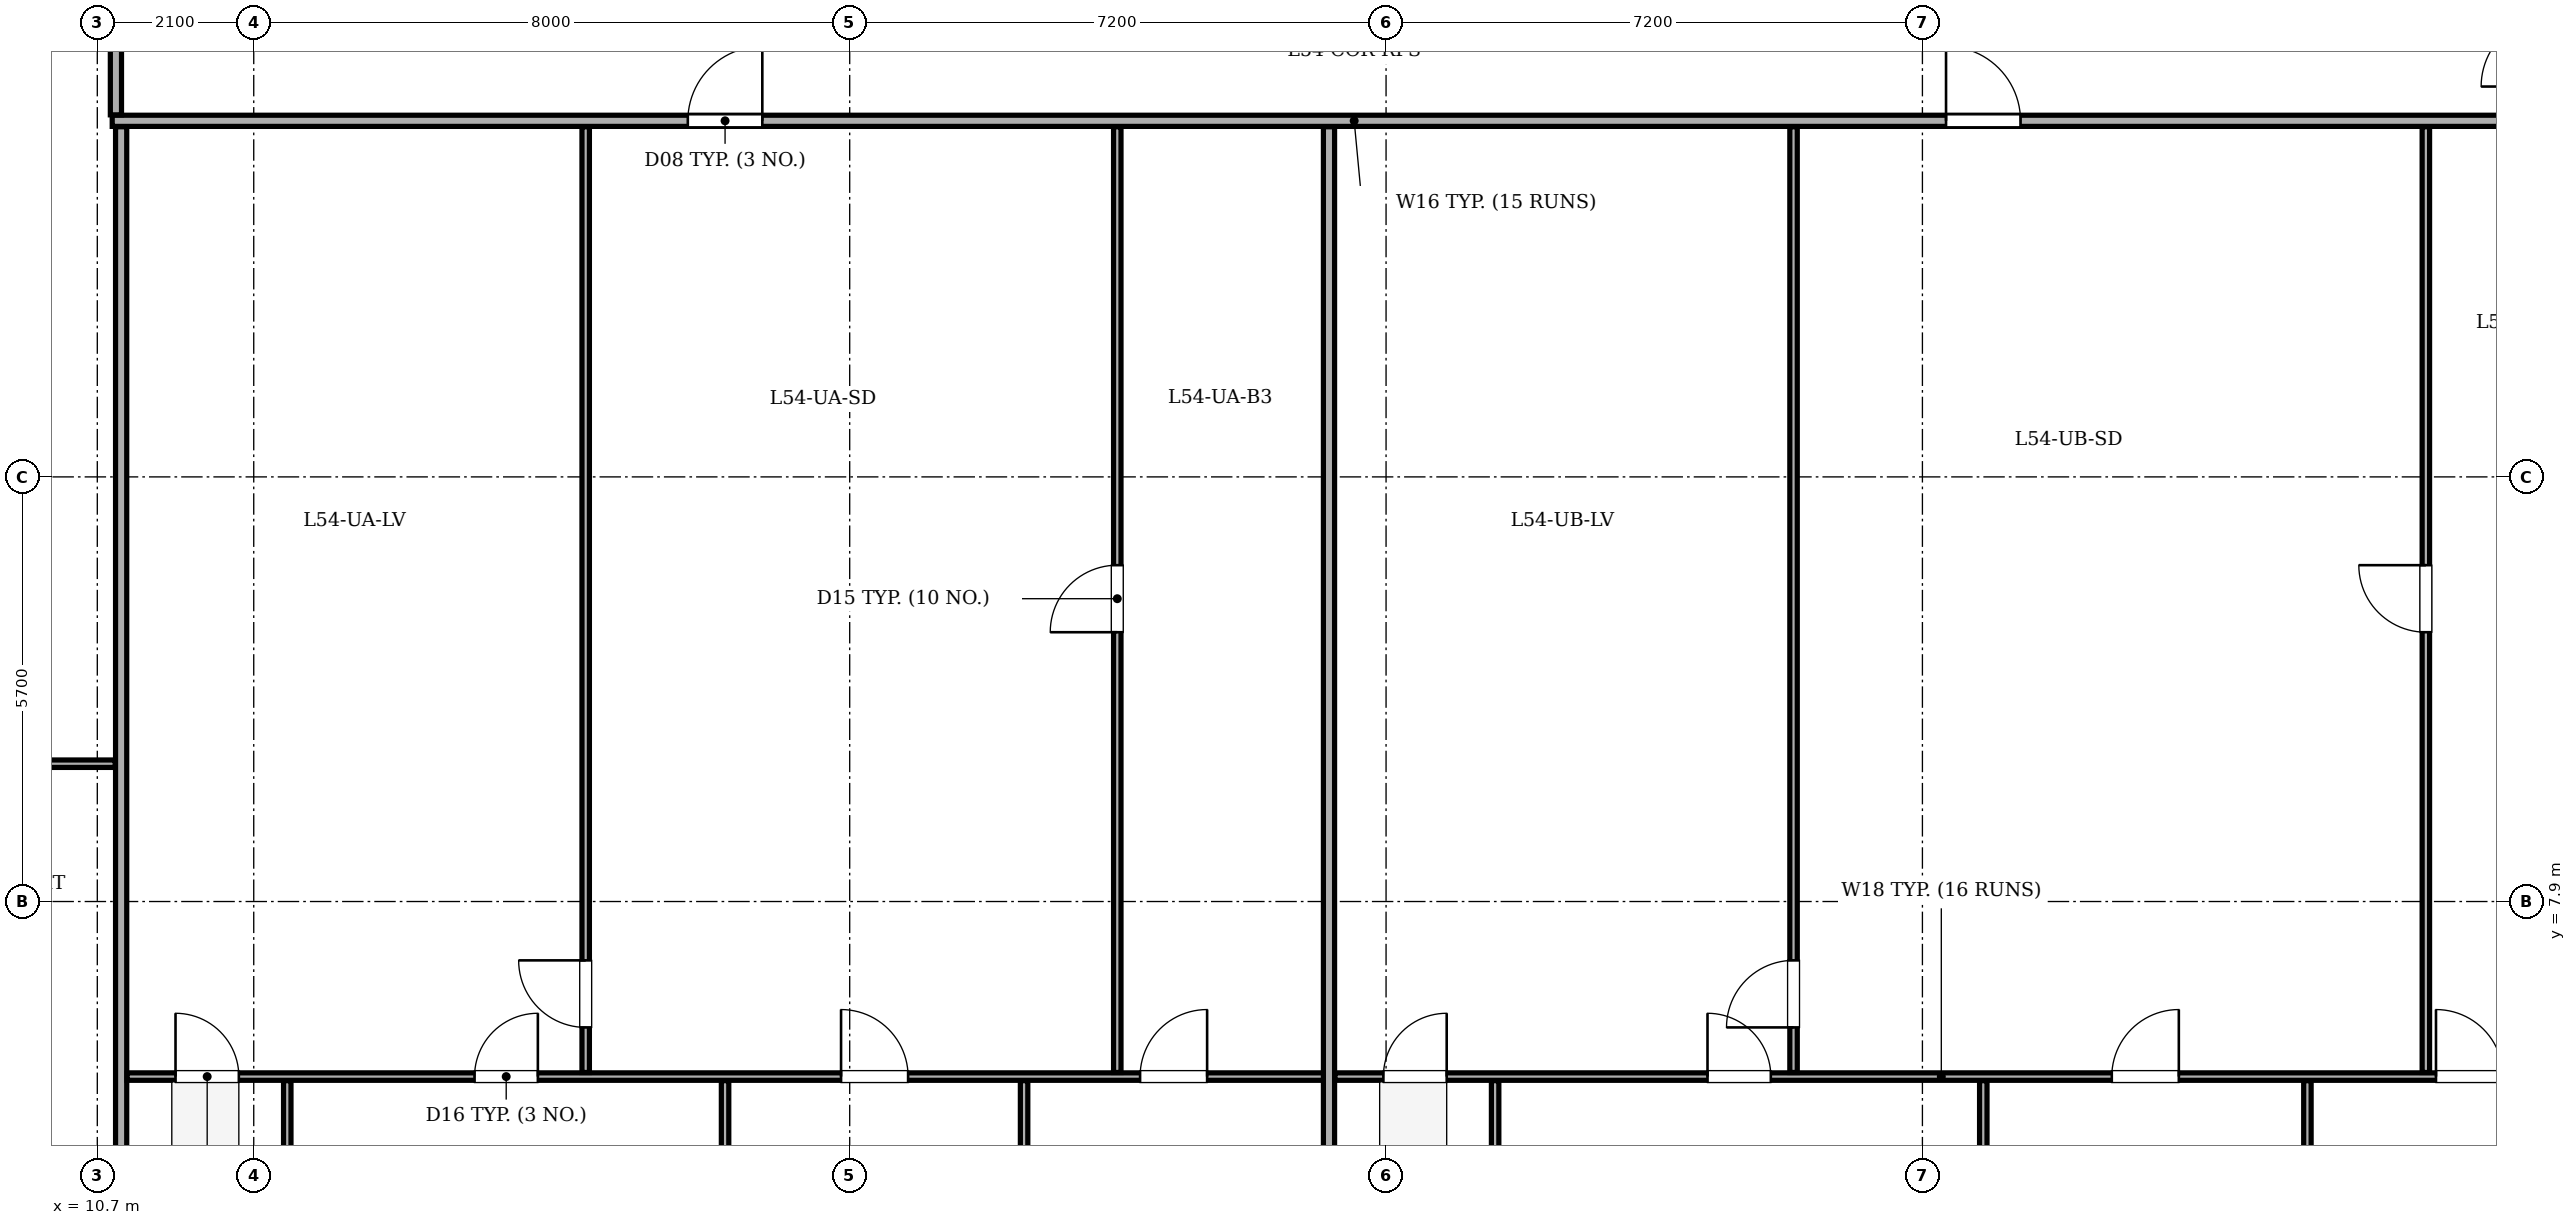
"""IFC4 building model, lengths in metres.
Left out: names, types, materials, properties, quantities, classifications, styles, units other than length and angle.
Written with IfcOpenShell. Run it as: python <this file> out.ifc"""

import sys

from ifc_helpers import new_model, si_unit, direction, frame, frame_2d, origin, place, context, subcontext, project, spatial, rectangle, extrude, element, fill, save


model = new_model("IFC4")
c1 = context("Model", 3, precision=1e-05, world=origin(), true_north=direction((0.0, 1.0)))
c2 = subcontext(c1, "Body", "Model", "MODEL_VIEW")
j1 = project(units=[si_unit("LENGTHUNIT", "METRE"), si_unit("PLANEANGLEUNIT", "RADIAN")], contexts=[c1])
p1 = place(None, origin())
s1 = spatial("IfcSite", under=j1, at=p1, CompositionType="ELEMENT")
p2 = place(p1, origin())
s2 = spatial("IfcBuilding", under=s1, at=p2, CompositionType="ELEMENT")
p3 = place(p2, frame((0.0, 0.0, 210.9)))
s3 = spatial("IfcBuildingStorey", under=s2, at=p3, CompositionType="ELEMENT", Elevation=210.9)
p4 = place(p3, frame((10.9, 18.38, 0.0), z_axis=(0.0, 0.0, 1.0), x_axis=(1.0, 0.0, 0.0)))
e1 = element("IfcWall", 1, at=p4, inside=s3, PredefinedType="PARTITIONING", context=c2, shape_type="SweptSolid", body=[
    extrude(rectangle(XDim=34.02, YDim=0.15, at=frame_2d((17.01, 0.0))), origin(), (0.0, 0.0, 1.0), 3.1),
])
p5 = place(p4, frame((7.727, 0.0, 0.0)))
e2 = element("IfcOpeningElement", 2, at=p5, cuts=e1, PredefinedType="OPENING", context=c2, shape_type="SweptSolid", body=[
    extrude(rectangle(XDim=1.0, YDim=2.1, at=frame_2d((0.5, 1.05))), frame((0.0, 0.085, 0.0), z_axis=(0.0, -1.0, 0.0), x_axis=(1.0, 0.0, 0.0)), (0.0, 0.0, 1.0), 0.17),
])
p6 = place(p4, frame((24.617, 0.0, 0.0)))
e3 = element("IfcOpeningElement", 3, at=p6, cuts=e1, PredefinedType="OPENING", context=c2, shape_type="SweptSolid", body=[
    extrude(rectangle(XDim=1.0, YDim=2.1, at=frame_2d((0.5, 1.05))), frame((0.0, 0.085, 0.0), z_axis=(0.0, -1.0, 0.0), x_axis=(1.0, 0.0, 0.0)), (0.0, 0.0, 1.0), 0.17),
])
p7 = place(p3, frame((11.02, 3.045, 0.0), z_axis=(0.0, 0.0, 1.0), x_axis=(0.0, 1.0, 0.0)))
e4 = element("IfcWall", 4, at=p7, inside=s3, PredefinedType="PARTITIONING", context=c2, shape_type="SweptSolid", body=[
    extrude(rectangle(XDim=15.255, YDim=0.15, at=frame_2d((7.627, 0.0))), origin(), (0.0, 0.0, 1.0), 3.1),
])
p8 = place(p3, frame((11.1, 5.55, 0.0), z_axis=(0.0, 0.0, 1.0), x_axis=(1.0, 0.0, 0.0)))
e5 = element("IfcWall", 5, at=p8, inside=s3, PredefinedType="PARTITIONING", context=c2, shape_type="SweptSolid", body=[
    extrude(rectangle(XDim=16.174, YDim=0.1, at=frame_2d((8.087, 0.0))), origin(), (0.0, 0.0, 1.0), 3.1),
])
p9 = place(p8, frame((0.65, 0.0, 0.0)))
e6 = element("IfcOpeningElement", 6, at=p9, cuts=e5, PredefinedType="OPENING", context=c2, shape_type="SweptSolid", body=[
    extrude(rectangle(XDim=0.85, YDim=2.05, at=frame_2d((0.425, 1.025))), frame((0.0, 0.06, 0.0), z_axis=(0.0, -1.0, 0.0), x_axis=(1.0, 0.0, 0.0)), (0.0, 0.0, 1.0), 0.12),
])
p10 = place(p8, frame((4.664, 0.0, 0.0)))
e7 = element("IfcOpeningElement", 7, at=p10, cuts=e5, PredefinedType="OPENING", context=c2, shape_type="SweptSolid", body=[
    extrude(rectangle(XDim=0.85, YDim=2.05, at=frame_2d((0.425, 1.025))), frame((0.0, 0.06, 0.0), z_axis=(0.0, -1.0, 0.0), x_axis=(1.0, 0.0, 0.0)), (0.0, 0.0, 1.0), 0.12),
])
p11 = place(p8, frame((9.584, 0.0, 0.0)))
e8 = element("IfcOpeningElement", 8, at=p11, cuts=e5, PredefinedType="OPENING", context=c2, shape_type="SweptSolid", body=[
    extrude(rectangle(XDim=0.9, YDim=2.05, at=frame_2d((0.45, 1.025))), frame((0.0, 0.06, 0.0), z_axis=(0.0, -1.0, 0.0), x_axis=(1.0, 0.0, 0.0)), (0.0, 0.0, 1.0), 0.12),
])
p12 = place(p8, frame((13.598, 0.0, 0.0)))
e9 = element("IfcOpeningElement", 9, at=p12, cuts=e5, PredefinedType="OPENING", context=c2, shape_type="SweptSolid", body=[
    extrude(rectangle(XDim=0.9, YDim=2.05, at=frame_2d((0.45, 1.025))), frame((0.0, 0.06, 0.0), z_axis=(0.0, -1.0, 0.0), x_axis=(1.0, 0.0, 0.0)), (0.0, 0.0, 1.0), 0.12),
])
p13 = place(p3, frame((24.392, 5.605, 0.0), z_axis=(0.0, 0.0, 1.0), x_axis=(0.0, 1.0, 0.0)))
e10 = element("IfcWall", 10, at=p13, inside=s3, PredefinedType="PARTITIONING", context=c2, shape_type="SweptSolid", body=[
    extrude(rectangle(XDim=12.695, YDim=0.1, at=frame_2d((6.348, 0.0))), origin(), (0.0, 0.0, 1.0), 3.1),
])
p14 = place(p13, frame((5.91, 0.0, 0.0)))
e11 = element("IfcOpeningElement", 11, at=p14, cuts=e10, PredefinedType="OPENING", context=c2, shape_type="SweptSolid", body=[
    extrude(rectangle(XDim=0.9, YDim=2.05, at=frame_2d((0.45, 1.025))), frame((0.0, 0.06, 0.0), z_axis=(0.0, -1.0, 0.0), x_axis=(1.0, 0.0, 0.0)), (0.0, 0.0, 1.0), 0.12),
])
p15 = place(p3, frame((17.256, 5.605, 0.0), z_axis=(0.0, 0.0, 1.0), x_axis=(0.0, 1.0, 0.0)))
e12 = element("IfcWall", 12, at=p15, inside=s3, PredefinedType="PARTITIONING", context=c2, shape_type="SweptSolid", body=[
    extrude(rectangle(XDim=12.695, YDim=0.1, at=frame_2d((6.348, 0.0))), origin(), (0.0, 0.0, 1.0), 3.1),
])
p16 = place(p15, frame((0.605, 0.0, 0.0)))
e13 = element("IfcOpeningElement", 13, at=p16, cuts=e12, PredefinedType="OPENING", context=c2, shape_type="SweptSolid", body=[
    extrude(rectangle(XDim=0.9, YDim=2.05, at=frame_2d((0.45, 1.025))), frame((0.0, 0.06, 0.0), z_axis=(0.0, -1.0, 0.0), x_axis=(1.0, 0.0, 0.0)), (0.0, 0.0, 1.0), 0.12),
])
for number, where, z_axis, x_axis in (
    (14, (13.25, 3.045, 0.0), (0.0, 0.0, 1.0), (0.0, 1.0, 0.0)),
    (15, (19.127, 3.045, 0.0), (0.0, 0.0, 1.0), (0.0, 1.0, 0.0)),
    (16, (23.141, 3.045, 0.0), (0.0, 0.0, 1.0), (0.0, 1.0, 0.0)),
):
    element("IfcWall", number, at=place(p3, frame(where, z_axis=z_axis, x_axis=x_axis)), inside=s3, PredefinedType="PARTITIONING", context=c2, shape_type="SweptSolid", body=[
        extrude(rectangle(XDim=2.45, YDim=0.1, at=frame_2d((1.225, 0.0))), origin(), (0.0, 0.0, 1.0), 3.1),
    ])
p17 = place(p3, frame((27.234, 3.045, 0.0), z_axis=(0.0, 0.0, 1.0), x_axis=(0.0, 1.0, 0.0)))
e17 = element("IfcWall", 17, at=p17, inside=s3, PredefinedType="PARTITIONING", context=c2, shape_type="SweptSolid", body=[
    extrude(rectangle(XDim=15.255, YDim=0.15, at=frame_2d((7.627, 0.0))), origin(), (0.0, 0.0, 1.0), 3.1),
])
p18 = place(p3, frame((27.314, 5.55, 0.0), z_axis=(0.0, 0.0, 1.0), x_axis=(1.0, 0.0, 0.0)))
e18 = element("IfcWall", 18, at=p18, inside=s3, PredefinedType="PARTITIONING", context=c2, shape_type="SweptSolid", body=[
    extrude(rectangle(XDim=17.526, YDim=0.1, at=frame_2d((8.763, 0.0))), origin(), (0.0, 0.0, 1.0), 3.1),
])
p19 = place(p18, frame((0.65, 0.0, 0.0)))
e19 = element("IfcOpeningElement", 19, at=p19, cuts=e18, PredefinedType="OPENING", context=c2, shape_type="SweptSolid", body=[
    extrude(rectangle(XDim=0.85, YDim=2.05, at=frame_2d((0.425, 1.025))), frame((0.0, 0.06, 0.0), z_axis=(0.0, -1.0, 0.0), x_axis=(1.0, 0.0, 0.0)), (0.0, 0.0, 1.0), 0.12),
])
p20 = place(p18, frame((5.001, 0.0, 0.0)))
e20 = element("IfcOpeningElement", 20, at=p20, cuts=e18, PredefinedType="OPENING", context=c2, shape_type="SweptSolid", body=[
    extrude(rectangle(XDim=0.85, YDim=2.05, at=frame_2d((0.425, 1.025))), frame((0.0, 0.06, 0.0), z_axis=(0.0, -1.0, 0.0), x_axis=(1.0, 0.0, 0.0)), (0.0, 0.0, 1.0), 0.12),
])
p21 = place(p18, frame((10.428, 0.0, 0.0)))
e21 = element("IfcOpeningElement", 21, at=p21, cuts=e18, PredefinedType="OPENING", context=c2, shape_type="SweptSolid", body=[
    extrude(rectangle(XDim=0.9, YDim=2.05, at=frame_2d((0.45, 1.025))), frame((0.0, 0.06, 0.0), z_axis=(0.0, -1.0, 0.0), x_axis=(1.0, 0.0, 0.0)), (0.0, 0.0, 1.0), 0.12),
])
p22 = place(p18, frame((14.78, 0.0, 0.0)))
e22 = element("IfcOpeningElement", 22, at=p22, cuts=e18, PredefinedType="OPENING", context=c2, shape_type="SweptSolid", body=[
    extrude(rectangle(XDim=0.9, YDim=2.05, at=frame_2d((0.45, 1.025))), frame((0.0, 0.06, 0.0), z_axis=(0.0, -1.0, 0.0), x_axis=(1.0, 0.0, 0.0)), (0.0, 0.0, 1.0), 0.12),
])
p23 = place(p3, frame((41.958, 5.605, 0.0), z_axis=(0.0, 0.0, 1.0), x_axis=(0.0, 1.0, 0.0)))
e23 = element("IfcWall", 23, at=p23, inside=s3, PredefinedType="PARTITIONING", context=c2, shape_type="SweptSolid", body=[
    extrude(rectangle(XDim=12.695, YDim=0.1, at=frame_2d((6.348, 0.0))), origin(), (0.0, 0.0, 1.0), 2.725),
])
p24 = place(p23, frame((5.91, 0.0, 0.0)))
e24 = element("IfcOpeningElement", 24, at=p24, cuts=e23, PredefinedType="OPENING", context=c2, shape_type="SweptSolid", body=[
    extrude(rectangle(XDim=0.9, YDim=2.05, at=frame_2d((0.45, 1.025))), frame((0.0, 0.06, 0.0), z_axis=(0.0, -1.0, 0.0), x_axis=(1.0, 0.0, 0.0)), (0.0, 0.0, 1.0), 0.12),
])
p25 = place(p3, frame((33.47, 5.605, 0.0), z_axis=(0.0, 0.0, 1.0), x_axis=(0.0, 1.0, 0.0)))
e25 = element("IfcWall", 25, at=p25, inside=s3, PredefinedType="PARTITIONING", context=c2, shape_type="SweptSolid", body=[
    extrude(rectangle(XDim=12.695, YDim=0.1, at=frame_2d((6.348, 0.0))), origin(), (0.0, 0.0, 1.0), 2.725),
])
p26 = place(p25, frame((0.605, 0.0, 0.0)))
e26 = element("IfcOpeningElement", 26, at=p26, cuts=e25, PredefinedType="OPENING", context=c2, shape_type="SweptSolid", body=[
    extrude(rectangle(XDim=0.9, YDim=2.05, at=frame_2d((0.45, 1.025))), frame((0.0, 0.06, 0.0), z_axis=(0.0, -1.0, 0.0), x_axis=(1.0, 0.0, 0.0)), (0.0, 0.0, 1.0), 0.12),
])
for number, where, z_axis, x_axis in (
    (27, (29.464, 3.045, 0.0), (0.0, 0.0, 1.0), (0.0, 1.0, 0.0)),
    (28, (36.017, 3.045, 0.0), (0.0, 0.0, 1.0), (0.0, 1.0, 0.0)),
):
    element("IfcWall", number, at=place(p3, frame(where, z_axis=z_axis, x_axis=x_axis)), inside=s3, PredefinedType="PARTITIONING", context=c2, shape_type="SweptSolid", body=[
        extrude(rectangle(XDim=2.45, YDim=0.1, at=frame_2d((1.225, 0.0))), origin(), (0.0, 0.0, 1.0), 3.1),
    ])
p27 = place(p3, frame((40.368, 3.045, 0.0), z_axis=(0.0, 0.0, 1.0), x_axis=(0.0, 1.0, 0.0)))
e29 = element("IfcWall", 29, at=p27, inside=s3, PredefinedType="PARTITIONING", context=c2, shape_type="SweptSolid", body=[
    extrude(rectangle(XDim=2.45, YDim=0.1, at=frame_2d((1.225, 0.0))), origin(), (0.0, 0.0, 1.0), 2.725),
])
p28 = place(p3, frame((10.95, 18.46, 0.0), z_axis=(0.0, 0.0, 1.0), x_axis=(0.0, 1.0, 0.0)))
e30 = element("IfcWall", 30, at=p28, inside=s3, PredefinedType="PARTITIONING", context=c2, shape_type="SweptSolid", body=[
    extrude(rectangle(XDim=1.79, YDim=0.15, at=frame_2d((0.895, 0.0))), origin(), (0.0, 0.0, 1.0), 3.1),
])
p29 = place(p3, frame((4.645, 9.75, 0.0), z_axis=(0.0, 0.0, 1.0), x_axis=(1.0, 0.0, 0.0)))
e31 = element("IfcWall", 31, at=p29, inside=s3, PredefinedType="PARTITIONING", context=c2, shape_type="SweptSolid", body=[
    extrude(rectangle(XDim=6.295, YDim=0.1, at=frame_2d((3.147, 0.0))), origin(), (0.0, 0.0, 1.0), 3.1),
])
p30 = place(p29, frame((0.472, 0.0, 0.0)))
e32 = element("IfcOpeningElement", 32, at=p30, cuts=e31, PredefinedType="OPENING", context=c2, shape_type="SweptSolid", body=[
    extrude(rectangle(XDim=0.85, YDim=2.05, at=frame_2d((0.425, 1.025))), frame((0.0, 0.06, 0.0), z_axis=(0.0, -1.0, 0.0), x_axis=(1.0, 0.0, 0.0)), (0.0, 0.0, 1.0), 0.12),
])
p31 = place(p29, frame((2.092, 0.0, 0.0)))
e33 = element("IfcOpeningElement", 33, at=p31, cuts=e31, PredefinedType="OPENING", context=c2, shape_type="SweptSolid", body=[
    extrude(rectangle(XDim=0.85, YDim=2.05, at=frame_2d((0.425, 1.025))), frame((0.0, 0.06, 0.0), z_axis=(0.0, -1.0, 0.0), x_axis=(1.0, 0.0, 0.0)), (0.0, 0.0, 1.0), 0.12),
])
p32 = place(p29, frame((4.285, 0.0, 0.0)))
e34 = element("IfcOpeningElement", 34, at=p32, cuts=e31, PredefinedType="OPENING", context=c2, shape_type="SweptSolid", body=[
    extrude(rectangle(XDim=0.9, YDim=2.05, at=frame_2d((0.45, 1.025))), frame((0.0, 0.06, 0.0), z_axis=(0.0, -1.0, 0.0), x_axis=(1.0, 0.0, 0.0)), (0.0, 0.0, 1.0), 0.12),
])
p33 = place(p5, origin())
e35 = element("IfcDoor", 35, at=p33, inside=s3, OperationType="SINGLE_SWING_RIGHT", PredefinedType="DOOR", context=c2, shape_type="SweptSolid", body=[
    extrude(rectangle(XDim=1.0, YDim=2.1, at=frame_2d((0.5, 1.05))), frame((0.0, 0.025, 0.0), z_axis=(0.0, -1.0, 0.0), x_axis=(1.0, 0.0, 0.0)), (0.0, 0.0, 1.0), 0.05),
])
fill(e2, e35)
p34 = place(p6, origin())
e36 = element("IfcDoor", 36, at=p34, inside=s3, OperationType="SINGLE_SWING_LEFT", PredefinedType="DOOR", context=c2, shape_type="SweptSolid", body=[
    extrude(rectangle(XDim=1.0, YDim=2.1, at=frame_2d((0.5, 1.05))), frame((0.0, 0.025, 0.0), z_axis=(0.0, -1.0, 0.0), x_axis=(1.0, 0.0, 0.0)), (0.0, 0.0, 1.0), 0.05),
])
fill(e3, e36)
p35 = place(p14, origin())
e37 = element("IfcDoor", 37, at=p35, inside=s3, OperationType="SINGLE_SWING_LEFT", PredefinedType="DOOR", context=c2, shape_type="SweptSolid", body=[
    extrude(rectangle(XDim=0.9, YDim=2.05, at=frame_2d((0.45, 1.025))), frame((0.0, 0.025, 0.0), z_axis=(0.0, -1.0, 0.0), x_axis=(1.0, 0.0, 0.0)), (0.0, 0.0, 1.0), 0.05),
])
fill(e11, e37)
p36 = place(p16, origin())
e38 = element("IfcDoor", 38, at=p36, inside=s3, OperationType="SINGLE_SWING_RIGHT", PredefinedType="DOOR", context=c2, shape_type="SweptSolid", body=[
    extrude(rectangle(XDim=0.9, YDim=2.05, at=frame_2d((0.45, 1.025))), frame((0.0, 0.025, 0.0), z_axis=(0.0, -1.0, 0.0), x_axis=(1.0, 0.0, 0.0)), (0.0, 0.0, 1.0), 0.05),
])
fill(e13, e38)
p37 = place(p9, origin())
e39 = element("IfcDoor", 39, at=p37, inside=s3, OperationType="SINGLE_SWING_LEFT", PredefinedType="DOOR", context=c2, shape_type="SweptSolid", body=[
    extrude(rectangle(XDim=0.85, YDim=2.05, at=frame_2d((0.425, 1.025))), frame((0.0, 0.025, 0.0), z_axis=(0.0, -1.0, 0.0), x_axis=(1.0, 0.0, 0.0)), (0.0, 0.0, 1.0), 0.05),
])
fill(e6, e39)
p38 = place(p10, origin())
e40 = element("IfcDoor", 40, at=p38, inside=s3, OperationType="SINGLE_SWING_RIGHT", PredefinedType="DOOR", context=c2, shape_type="SweptSolid", body=[
    extrude(rectangle(XDim=0.85, YDim=2.05, at=frame_2d((0.425, 1.025))), frame((0.0, 0.025, 0.0), z_axis=(0.0, -1.0, 0.0), x_axis=(1.0, 0.0, 0.0)), (0.0, 0.0, 1.0), 0.05),
])
fill(e7, e40)
p39 = place(p11, origin())
e41 = element("IfcDoor", 41, at=p39, inside=s3, OperationType="SINGLE_SWING_LEFT", PredefinedType="DOOR", context=c2, shape_type="SweptSolid", body=[
    extrude(rectangle(XDim=0.9, YDim=2.05, at=frame_2d((0.45, 1.025))), frame((0.0, 0.025, 0.0), z_axis=(0.0, -1.0, 0.0), x_axis=(1.0, 0.0, 0.0)), (0.0, 0.0, 1.0), 0.05),
])
fill(e8, e41)
p40 = place(p12, origin())
e42 = element("IfcDoor", 42, at=p40, inside=s3, OperationType="SINGLE_SWING_RIGHT", PredefinedType="DOOR", context=c2, shape_type="SweptSolid", body=[
    extrude(rectangle(XDim=0.9, YDim=2.05, at=frame_2d((0.45, 1.025))), frame((0.0, 0.025, 0.0), z_axis=(0.0, -1.0, 0.0), x_axis=(1.0, 0.0, 0.0)), (0.0, 0.0, 1.0), 0.05),
])
fill(e9, e42)
p41 = place(p24, origin())
e43 = element("IfcDoor", 43, at=p41, inside=s3, OperationType="SINGLE_SWING_RIGHT", PredefinedType="DOOR", context=c2, shape_type="SweptSolid", body=[
    extrude(rectangle(XDim=0.9, YDim=2.05, at=frame_2d((0.45, 1.025))), frame((0.0, 0.025, 0.0), z_axis=(0.0, -1.0, 0.0), x_axis=(1.0, 0.0, 0.0)), (0.0, 0.0, 1.0), 0.05),
])
fill(e24, e43)
p42 = place(p26, origin())
e44 = element("IfcDoor", 44, at=p42, inside=s3, OperationType="SINGLE_SWING_LEFT", PredefinedType="DOOR", context=c2, shape_type="SweptSolid", body=[
    extrude(rectangle(XDim=0.9, YDim=2.05, at=frame_2d((0.45, 1.025))), frame((0.0, 0.025, 0.0), z_axis=(0.0, -1.0, 0.0), x_axis=(1.0, 0.0, 0.0)), (0.0, 0.0, 1.0), 0.05),
])
fill(e26, e44)
p43 = place(p19, origin())
e45 = element("IfcDoor", 45, at=p43, inside=s3, OperationType="SINGLE_SWING_RIGHT", PredefinedType="DOOR", context=c2, shape_type="SweptSolid", body=[
    extrude(rectangle(XDim=0.85, YDim=2.05, at=frame_2d((0.425, 1.025))), frame((0.0, 0.025, 0.0), z_axis=(0.0, -1.0, 0.0), x_axis=(1.0, 0.0, 0.0)), (0.0, 0.0, 1.0), 0.05),
])
fill(e19, e45)
p44 = place(p20, origin())
e46 = element("IfcDoor", 46, at=p44, inside=s3, OperationType="SINGLE_SWING_LEFT", PredefinedType="DOOR", context=c2, shape_type="SweptSolid", body=[
    extrude(rectangle(XDim=0.85, YDim=2.05, at=frame_2d((0.425, 1.025))), frame((0.0, 0.025, 0.0), z_axis=(0.0, -1.0, 0.0), x_axis=(1.0, 0.0, 0.0)), (0.0, 0.0, 1.0), 0.05),
])
fill(e20, e46)
p45 = place(p21, origin())
e47 = element("IfcDoor", 47, at=p45, inside=s3, OperationType="SINGLE_SWING_RIGHT", PredefinedType="DOOR", context=c2, shape_type="SweptSolid", body=[
    extrude(rectangle(XDim=0.9, YDim=2.05, at=frame_2d((0.45, 1.025))), frame((0.0, 0.025, 0.0), z_axis=(0.0, -1.0, 0.0), x_axis=(1.0, 0.0, 0.0)), (0.0, 0.0, 1.0), 0.05),
])
fill(e21, e47)
p46 = place(p22, origin())
e48 = element("IfcDoor", 48, at=p46, inside=s3, OperationType="SINGLE_SWING_LEFT", PredefinedType="DOOR", context=c2, shape_type="SweptSolid", body=[
    extrude(rectangle(XDim=0.9, YDim=2.05, at=frame_2d((0.45, 1.025))), frame((0.0, 0.025, 0.0), z_axis=(0.0, -1.0, 0.0), x_axis=(1.0, 0.0, 0.0)), (0.0, 0.0, 1.0), 0.05),
])
fill(e22, e48)
save(model, sys.argv[1])
